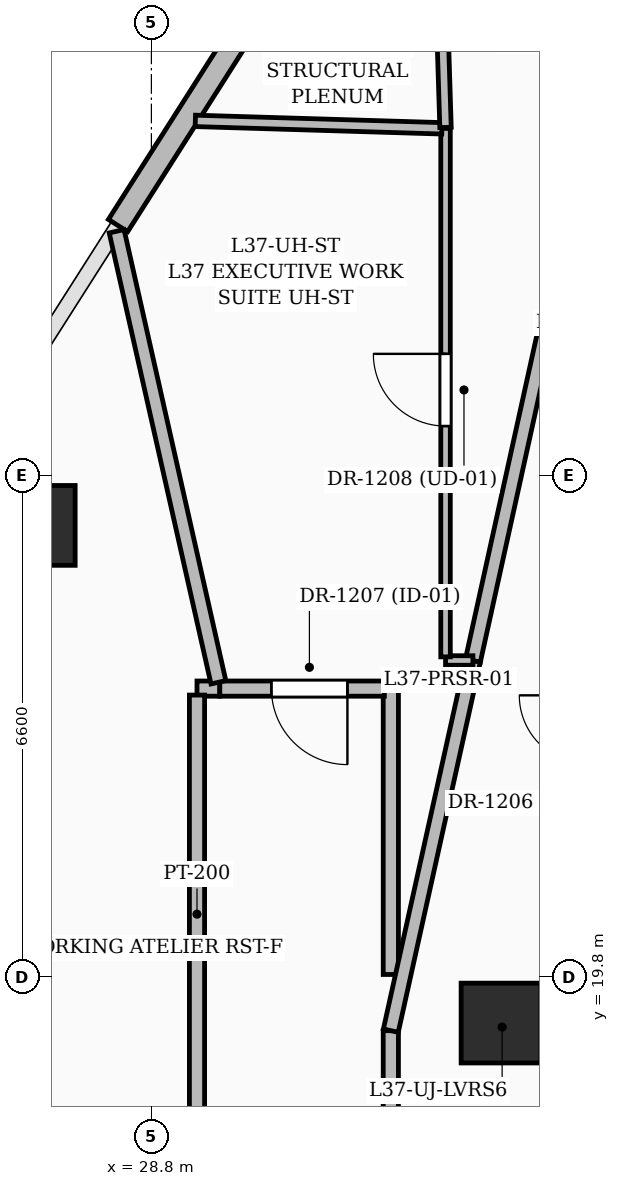
"""IFC4 building model, lengths in metres.
Left out: names, types, materials, properties, quantities, classifications, styles, units other than length and angle.
Written with IfcOpenShell. Run it as: python <this file> out.ifc"""

import sys

from ifc_helpers import new_model, si_unit, direction, frame, frame_2d, origin, origin_2d, place, context, subcontext, project, spatial, rectangle, extrude, element, fill, save


model = new_model("IFC4")
c1 = context("Model", 3, precision=1e-05, world=origin(), true_north=direction((0.0, 1.0)))
c2 = subcontext(c1, "Body", "Model", "MODEL_VIEW")
j1 = project(units=[si_unit("LENGTHUNIT", "METRE"), si_unit("PLANEANGLEUNIT", "RADIAN")], contexts=[c1])
p1 = place(None, origin())
s1 = spatial("IfcSite", under=j1, at=p1, CompositionType="ELEMENT")
p2 = place(p1, origin())
s2 = spatial("IfcBuilding", under=s1, at=p2, CompositionType="ELEMENT")
p3 = place(p2, frame((0.0, 0.0, 146.4)))
s3 = spatial("IfcBuildingStorey", under=s2, at=p3, CompositionType="ELEMENT", Elevation=146.4)
for number, where, z_axis, x_axis in (
    (1, (33.4, 19.2, 0.0), (0.0, 0.0, 1.0), (1.0, 0.0, 0.0)),
    (2, (27.272, 25.747, 0.0), (0.0, 0.0, 1.0), (1.0, 0.0, 0.0)),
):
    element("IfcColumn", number, at=place(p3, frame(where, z_axis=z_axis, x_axis=x_axis)), inside=s3, PredefinedType="COLUMN", context=c2, shape_type="SweptSolid", body=[
        extrude(rectangle(XDim=1.05, YDim=1.05, at=origin_2d()), origin(), (0.0, 0.0, 1.0), 3.6),
    ])
p4 = place(p3, frame((28.361, 29.692, 0.0), z_axis=(0.0, 0.0, 1.0), x_axis=(0.537133761371, 0.843497079068, 0.0)))
e3 = element("IfcWall", 3, at=p4, inside=s3, PredefinedType="SOLIDWALL", context=c2, shape_type="SweptSolid", body=[
    extrude(rectangle(XDim=6.789, YDim=0.3, at=frame_2d((3.395, 0.0))), origin(), (0.0, 0.0, 1.0), 3.35),
])
p5 = place(p4, frame((3.403, 0.0, 0.6)))
e4 = element("IfcOpeningElement", 4, at=p5, cuts=e3, PredefinedType="OPENING", context=c2, shape_type="SweptSolid", body=[
    extrude(rectangle(XDim=1.5, YDim=2.1, at=frame_2d((0.75, 1.05))), frame((0.0, 0.16, 0.0), z_axis=(0.0, -1.0, 0.0), x_axis=(1.0, 0.0, 0.0)), (0.0, 0.0, 1.0), 0.32),
])
p6 = place(p3, frame((29.7, 23.6, 0.0), z_axis=(0.0, 0.0, 1.0), x_axis=(-1.0, 0.0, 0.0)))
e5 = element("IfcWall", 5, at=p6, inside=s3, PredefinedType="PARTITIONING", context=c2, shape_type="SweptSolid", body=[
    extrude(rectangle(XDim=0.3, YDim=0.2, at=frame_2d((0.15, 0.0))), origin(), (0.0, 0.0, 1.0), 2.393),
])
p7 = place(p3, frame((29.4, 23.515, 0.0), z_axis=(0.0, 0.0, 1.0), x_axis=(0.0, -1.0, 0.0)))
e6 = element("IfcWall", 6, at=p7, inside=s3, PredefinedType="PARTITIONING", context=c2, shape_type="SweptSolid", body=[
    extrude(rectangle(XDim=5.765, YDim=0.2, at=frame_2d((2.882, 0.0))), origin(), (0.0, 0.0, 1.0), 2.393),
])
p8 = place(p3, frame((29.315, 17.753, 0.0), z_axis=(0.0, 0.0, 1.0), x_axis=(-0.999333344418, 0.036508447439, 0.0)))
e7 = element("IfcWall", 7, at=p8, inside=s3, PredefinedType="PARTITIONING", context=c2, shape_type="SweptSolid", body=[
    extrude(rectangle(XDim=8.219, YDim=0.2, at=frame_2d((4.109, 0.0))), origin(), (0.0, 0.0, 1.0), 2.393),
])
p9 = place(p8, frame((3.287, 0.0, 0.0)))
e8 = element("IfcOpeningElement", 8, at=p9, cuts=e7, PredefinedType="OPENING", context=c2, shape_type="SweptSolid", body=[
    extrude(rectangle(XDim=1.6, YDim=2.3, at=frame_2d((0.8, 1.15))), frame((0.0, 0.11, 0.0), z_axis=(0.0, -1.0, 0.0), x_axis=(1.0, 0.0, 0.0)), (0.0, 0.0, 1.0), 0.22),
])
p10 = place(p3, frame((31.95, 17.835, 0.0), z_axis=(0.0, 0.0, 1.0), x_axis=(0.0, 1.0, 0.0)))
e9 = element("IfcWall", 9, at=p10, inside=s3, PredefinedType="PARTITIONING", context=c2, shape_type="SweptSolid", body=[
    extrude(rectangle(XDim=1.265, YDim=0.2, at=frame_2d((0.633, 0.0))), origin(), (0.0, 0.0, 1.0), 3.35),
])
p11 = place(p3, frame((31.95, 19.839, 0.0), z_axis=(0.0, 0.0, 1.0), x_axis=(0.0, 1.0, 0.0)))
e10 = element("IfcWall", 10, at=p11, inside=s3, PredefinedType="PARTITIONING", context=c2, shape_type="SweptSolid", body=[
    extrude(rectangle(XDim=3.761, YDim=0.2, at=frame_2d((1.88, 0.0))), origin(), (0.0, 0.0, 1.0), 2.393),
])
p12 = place(p3, frame((31.865, 23.6, 0.0), z_axis=(0.0, 0.0, 1.0), x_axis=(-1.0, 0.0, 0.0)))
e11 = element("IfcWall", 11, at=p12, inside=s3, PredefinedType="PARTITIONING", context=c2, shape_type="SweptSolid", body=[
    extrude(rectangle(XDim=2.165, YDim=0.2, at=frame_2d((1.083, 0.0))), origin(), (0.0, 0.0, 1.0), 2.787),
])
p13 = place(p12, frame((0.486, 0.0, 0.0)))
e12 = element("IfcOpeningElement", 12, at=p13, cuts=e11, PredefinedType="OPENING", context=c2, shape_type="SweptSolid", body=[
    extrude(rectangle(XDim=1.0, YDim=2.2, at=frame_2d((0.5, 1.1))), frame((0.0, 0.11, 0.0), z_axis=(0.0, -1.0, 0.0), x_axis=(1.0, 0.0, 0.0)), (0.0, 0.0, 1.0), 0.22),
])
p14 = place(p3, frame((29.682, 23.683, 0.0), z_axis=(0.0, 0.0, 1.0), x_axis=(-0.22009949455, 0.97547742798, 0.0)))
e13 = element("IfcWall", 13, at=p14, inside=s3, PredefinedType="PARTITIONING", context=c2, shape_type="SweptSolid", body=[
    extrude(rectangle(XDim=6.083, YDim=0.2, at=frame_2d((3.042, 0.0))), origin(), (0.0, 0.0, 1.0), 2.57),
])
p15 = place(p3, frame((33.03, 23.97, 0.0), z_axis=(0.0, 0.0, 1.0), x_axis=(-0.216526223157, -0.976276802288, 0.0)))
e14 = element("IfcWall", 14, at=p15, inside=s3, PredefinedType="PARTITIONING", context=c2, shape_type="SweptSolid", body=[
    extrude(rectangle(XDim=4.988, YDim=0.2, at=frame_2d((2.494, 0.0))), origin(), (0.0, 0.0, 1.0), 2.393),
])
p16 = place(p3, frame((35.74, 36.26, 0.0), z_axis=(0.0, 0.0, 1.0), x_axis=(-0.215328042863, -0.976541772766, 0.0)))
e15 = element("IfcWall", 15, at=p16, inside=s3, PredefinedType="PARTITIONING", context=c2, shape_type="SweptSolid", body=[
    extrude(rectangle(XDim=12.585, YDim=0.2, at=frame_2d((6.292, 0.0))), origin(), (0.0, 0.0, 1.0), 2.393),
])
p17 = place(p3, frame((33.03, 23.97, 0.0), z_axis=(0.0, 0.0, 1.0), x_axis=(-1.0, 0.0, 0.0)))
e16 = element("IfcWall", 16, at=p17, inside=s3, PredefinedType="PARTITIONING", context=c2, shape_type="SweptSolid", body=[
    extrude(rectangle(XDim=0.36, YDim=0.125, at=frame_2d((0.18, 0.0))), origin(), (0.0, 0.0, 1.0), 3.35),
])
p18 = place(p3, frame((32.67, 24.018, 0.0), z_axis=(0.0, 0.0, 1.0), x_axis=(0.0, 1.0, 0.0)))
e17 = element("IfcWall", 17, at=p18, inside=s3, PredefinedType="PARTITIONING", context=c2, shape_type="SweptSolid", body=[
    extrude(rectangle(XDim=6.952, YDim=0.125, at=frame_2d((3.476, 0.0))), origin(), (0.0, 0.0, 1.0), 2.787),
])
p19 = place(p18, frame((3.036, 0.0, 0.0)))
e18 = element("IfcOpeningElement", 18, at=p19, cuts=e17, PredefinedType="OPENING", context=c2, shape_type="SweptSolid", body=[
    extrude(rectangle(XDim=0.95, YDim=2.2, at=frame_2d((0.475, 1.1))), frame((0.0, 0.072, 0.0), z_axis=(0.0, -1.0, 0.0), x_axis=(1.0, 0.0, 0.0)), (0.0, 0.0, 1.0), 0.145),
])
p20 = place(p3, frame((32.623, 30.971, 0.0), z_axis=(0.0, 0.0, 1.0), x_axis=(-0.999545103735, 0.03015933684, 0.0)))
e19 = element("IfcWall", 19, at=p20, inside=s3, PredefinedType="PARTITIONING", context=c2, shape_type="SweptSolid", body=[
    extrude(rectangle(XDim=3.246, YDim=0.15, at=frame_2d((1.623, 0.0))), origin(), (0.0, 0.0, 1.0), 2.57),
])
p21 = place(p3, frame((32.515, 35.969, 0.0), z_axis=(0.0, 0.0, 1.0), x_axis=(0.031025448674, -0.999518594892, 0.0)))
e20 = element("IfcWall", 20, at=p21, inside=s3, PredefinedType="PARTITIONING", context=c2, shape_type="SweptSolid", body=[
    extrude(rectangle(XDim=4.989, YDim=0.15, at=frame_2d((2.495, 0.0))), origin(), (0.0, 0.0, 1.0), 2.57),
])
p22 = place(p13, origin())
e21 = element("IfcDoor", 21, at=p22, inside=s3, OperationType="SINGLE_SWING_LEFT", PredefinedType="DOOR", context=c2, shape_type="SweptSolid", body=[
    extrude(rectangle(XDim=1.0, YDim=2.2, at=frame_2d((0.5, 1.1))), frame((0.0, 0.025, 0.0), z_axis=(0.0, -1.0, 0.0), x_axis=(1.0, 0.0, 0.0)), (0.0, 0.0, 1.0), 0.05),
])
fill(e12, e21)
p23 = place(p19, origin())
e22 = element("IfcDoor", 22, at=p23, inside=s3, OperationType="SINGLE_SWING_RIGHT", PredefinedType="DOOR", context=c2, shape_type="SweptSolid", body=[
    extrude(rectangle(XDim=0.95, YDim=2.2, at=frame_2d((0.475, 1.1))), frame((0.0, 0.025, 0.0), z_axis=(0.0, -1.0, 0.0), x_axis=(1.0, 0.0, 0.0)), (0.0, 0.0, 1.0), 0.05),
])
fill(e18, e22)
save(model, sys.argv[1])
